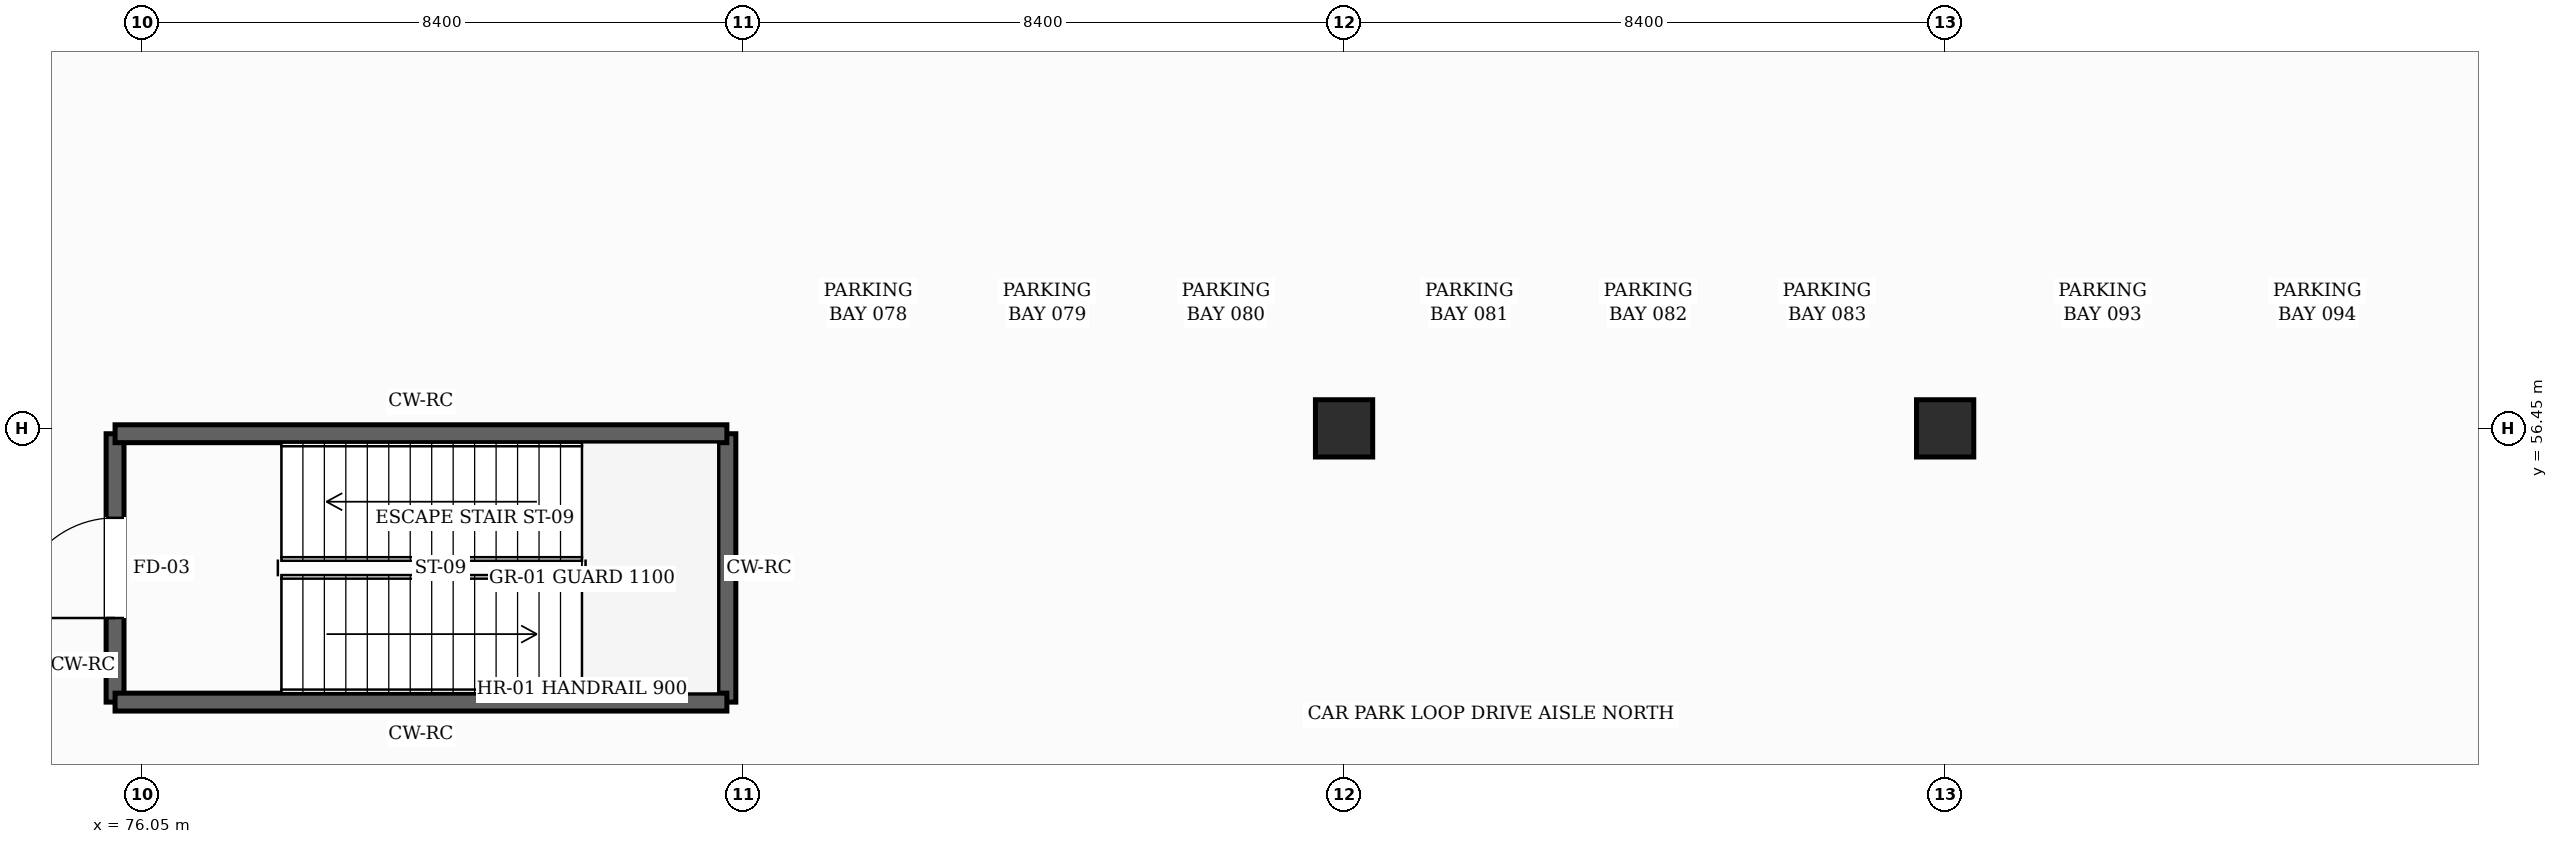
"""IFC4 building model, lengths in metres.
Left out: names, types, materials, properties, quantities, classifications, styles, units other than length and angle.
Written with IfcOpenShell. Run it as: python <this file> out.ifc"""

import sys

from ifc_helpers import new_model, si_unit, direction, frame, frame_2d, origin, origin_2d, place, context, subcontext, project, spatial, rectangle, hollow_rectangle, extrude, element, fill, save


model = new_model("IFC4")
c1 = context("Model", 3, precision=1e-05, world=origin(), true_north=direction((0.0, 1.0)))
c2 = subcontext(c1, "Body", "Model", "MODEL_VIEW")
j1 = project(units=[si_unit("LENGTHUNIT", "METRE"), si_unit("PLANEANGLEUNIT", "RADIAN")], contexts=[c1])
p1 = place(None, origin())
s1 = spatial("IfcSite", under=j1, at=p1, CompositionType="ELEMENT")
p2 = place(p1, origin())
s2 = spatial("IfcBuilding", under=s1, at=p2, CompositionType="ELEMENT")
p3 = place(p2, frame((0.0, 0.0, -5.4)))
s3 = spatial("IfcBuildingStorey", under=s2, at=p3, CompositionType="ELEMENT", Elevation=-5.4)
for number, where, z_axis, x_axis in (
    (1, (92.85, 56.45, 0.0), (0.0, 0.0, 1.0), (1.0, 0.0, 0.0)),
    (2, (101.25, 56.45, 0.0), (0.0, 0.0, 1.0), (1.0, 0.0, 0.0)),
):
    element("IfcColumn", number, at=place(p3, frame(where, z_axis=z_axis, x_axis=x_axis)), inside=s3, PredefinedType="COLUMN", context=c2, shape_type="SweptSolid", body=[
        extrude(hollow_rectangle(XDim=0.8, YDim=0.8, WallThickness=0.032, InnerFilletRadius=0.032, OuterFilletRadius=0.064, at=origin_2d()), origin(), (0.0, 0.0, 1.0), 5.4),
    ])
p4 = place(p3, frame((75.675, 52.625, 0.0), z_axis=(0.0, 0.0, 1.0), x_axis=(0.0, 1.0, 0.0)))
e3 = element("IfcWall", 3, at=p4, inside=s3, PredefinedType="SHEAR", context=c2, shape_type="SweptSolid", body=[
    extrude(rectangle(XDim=3.75, YDim=0.25, at=frame_2d((1.875, 0.0))), origin(), (0.0, 0.0, 1.0), 5.12),
])
p5 = place(p4, frame((1.175, 0.0, 0.0)))
e4 = element("IfcOpeningElement", 4, at=p5, cuts=e3, PredefinedType="OPENING", context=c2, shape_type="SweptSolid", body=[
    extrude(rectangle(XDim=1.4, YDim=2.25, at=frame_2d((0.7, 1.125))), frame((0.0, 0.135, 0.0), z_axis=(0.0, -1.0, 0.0), x_axis=(1.0, 0.0, 0.0)), (0.0, 0.0, 1.0), 0.27),
])
p6 = place(p3, frame((84.225, 56.375, 0.0), z_axis=(0.0, 0.0, 1.0), x_axis=(0.0, -1.0, 0.0)))
e5 = element("IfcWall", 5, at=p6, inside=s3, PredefinedType="SHEAR", context=c2, shape_type="SweptSolid", body=[
    extrude(rectangle(XDim=3.75, YDim=0.25, at=frame_2d((1.875, 0.0))), origin(), (0.0, 0.0, 1.0), 5.12),
])
for number, where, z_axis, x_axis in (
    (6, (84.225, 52.625, 0.0), (0.0, 0.0, 1.0), (-1.0, 0.0, 0.0)),
    (7, (75.675, 56.375, 0.0), (0.0, 0.0, 1.0), (1.0, 0.0, 0.0)),
):
    element("IfcWall", number, at=place(p3, frame(where, z_axis=z_axis, x_axis=x_axis)), inside=s3, PredefinedType="SHEAR", context=c2, shape_type="SweptSolid", body=[
        extrude(rectangle(XDim=8.55, YDim=0.25, at=frame_2d((4.275, 0.0))), origin(), (0.0, 0.0, 1.0), 5.12),
    ])
p7 = place(p5, origin())
e8 = element("IfcDoor", 8, at=p7, inside=s3, OperationType="SINGLE_SWING_LEFT", PredefinedType="DOOR", context=c2, shape_type="SweptSolid", body=[
    extrude(rectangle(XDim=1.4, YDim=2.25, at=frame_2d((0.7, 1.125))), frame((0.0, 0.025, 0.0), z_axis=(0.0, -1.0, 0.0), x_axis=(1.0, 0.0, 0.0)), (0.0, 0.0, 1.0), 0.05),
])
fill(e4, e8)
save(model, sys.argv[1])
